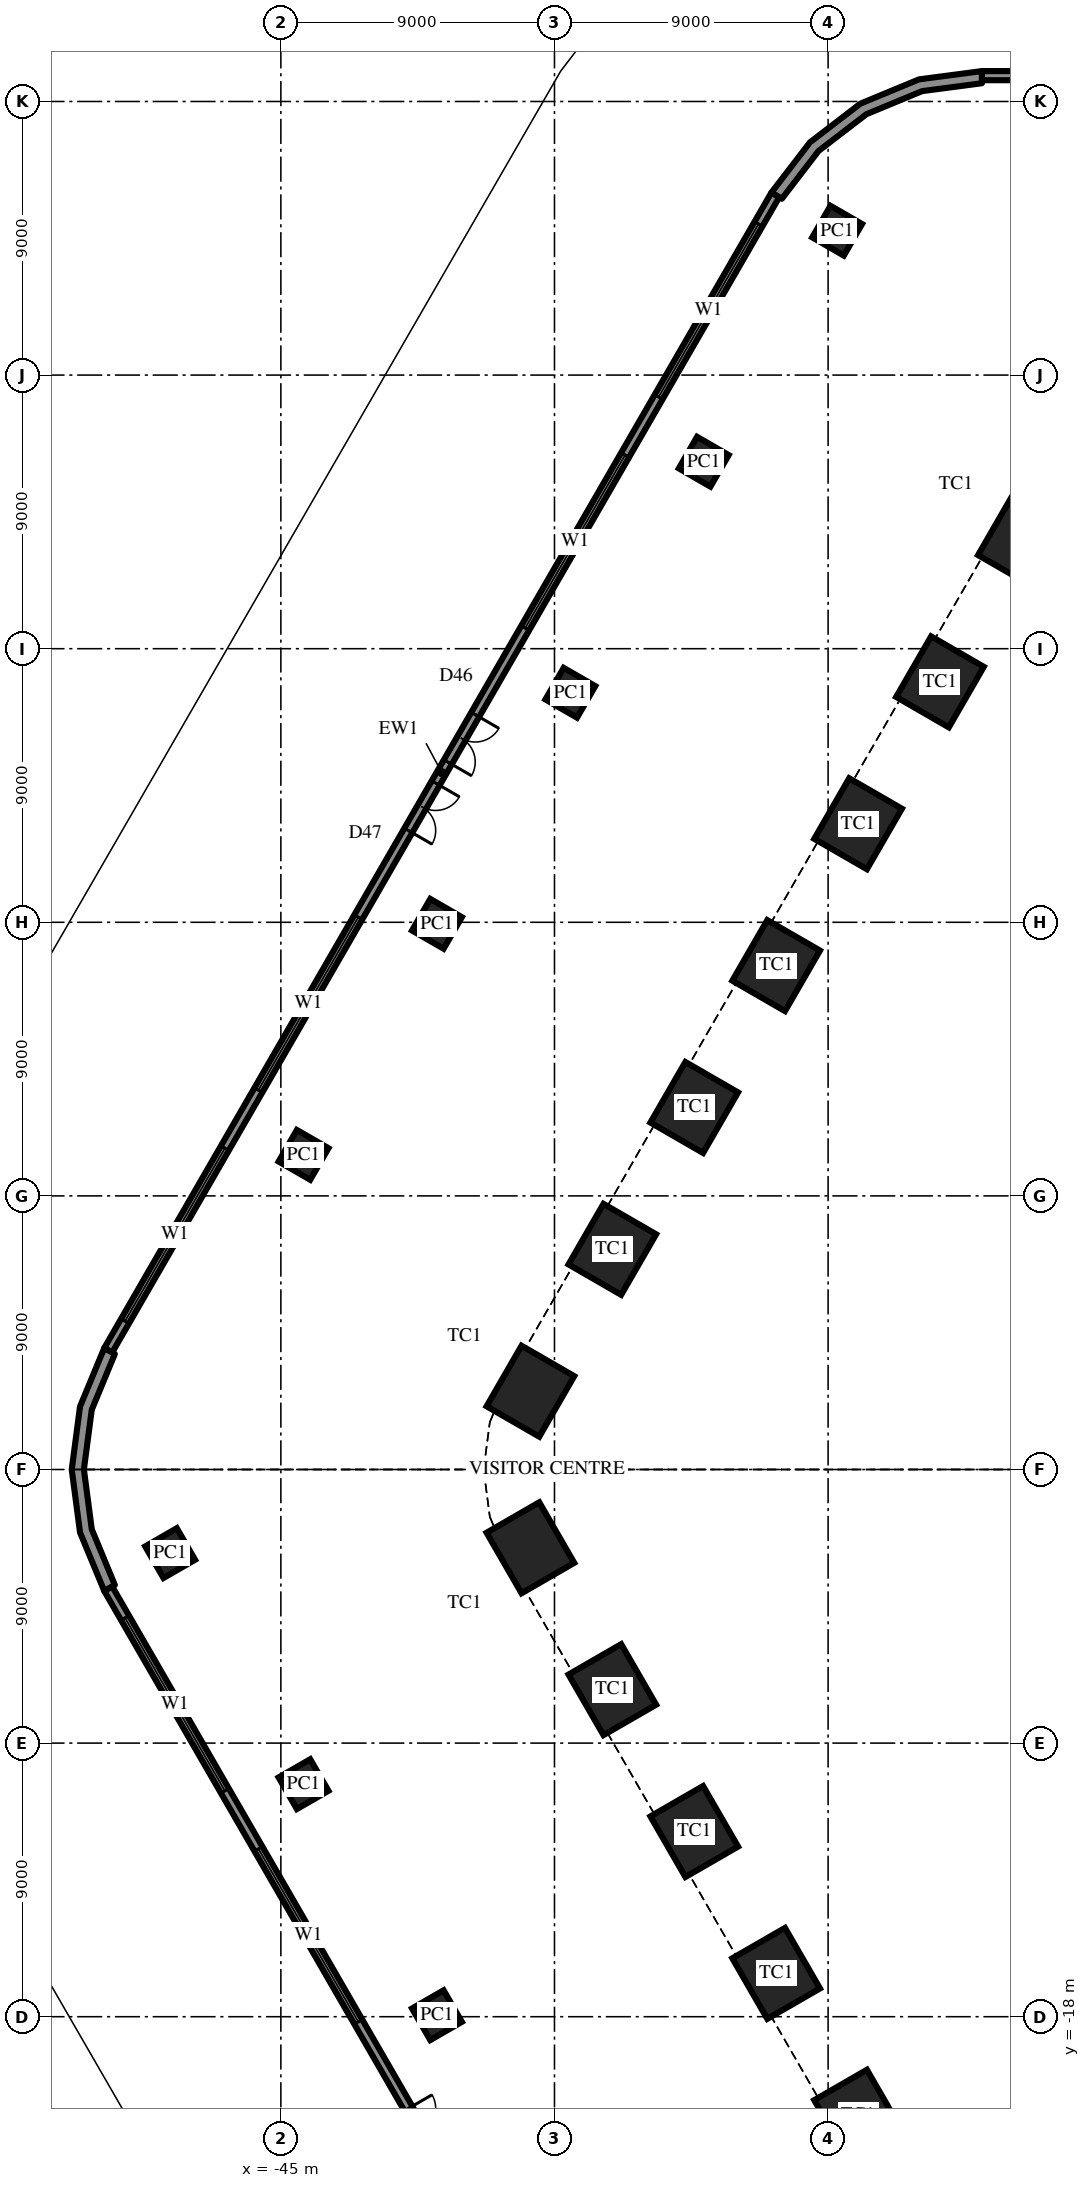
"""IFC4 building model, lengths in metres.
Left out: names, types, materials, properties, quantities, classifications, styles, units other than length and angle.
Written with IfcOpenShell. Run it as: python <this file> out.ifc"""

import sys

from ifc_helpers import new_model, si_unit, direction, frame, frame_2d, origin, origin_2d, place, context, subcontext, project, spatial, polyline, rectangle, outline, extrude, element, fill, save


model = new_model("IFC4")
c1 = context("Model", 3, precision=1e-05, world=origin(), true_north=direction((0.0, 1.0)))
c2 = subcontext(c1, "Body", "Model", "MODEL_VIEW")
j1 = project(units=[si_unit("LENGTHUNIT", "METRE"), si_unit("PLANEANGLEUNIT", "RADIAN")], contexts=[c1])
p1 = place(None, origin())
s1 = spatial("IfcSite", under=j1, at=p1, CompositionType="ELEMENT")
p2 = place(p1, origin())
s2 = spatial("IfcBuilding", under=s1, at=p2, CompositionType="ELEMENT")
p3 = place(p2, origin())
s3 = spatial("IfcBuildingStorey", under=s2, at=p3, CompositionType="ELEMENT", Elevation=0.0)
for number, where, z_axis, x_axis in (
    (1, (-20.626, 30.575, 0.0), (0.0, 0.0, 1.0), (-0.5, -0.866, 0.0)),
    (2, (-23.32, 25.908, 0.0), (0.0, 0.0, 1.0), (-0.5, -0.866, 0.0)),
    (3, (-26.014, 21.242, 0.0), (0.0, 0.0, 1.0), (-0.5, -0.866, 0.0)),
    (4, (-28.709, 16.575, 0.0), (0.0, 0.0, 1.0), (-0.5, -0.866, 0.0)),
    (5, (-31.403, 11.908, 0.0), (0.0, 0.0, 1.0), (-0.5, -0.866, 0.0)),
    (6, (-34.097, 7.242, 0.0), (0.0, 0.0, 1.0), (-0.5, -0.866, 0.0)),
    (7, (-36.792, 2.575, 0.0), (0.0, 0.0, 1.0), (-0.5, -0.866, 0.0)),
    (8, (-36.792, -2.575, 0.0), (0.0, 0.0, 1.0), (0.5, -0.866, 0.0)),
    (9, (-34.097, -7.242, 0.0), (0.0, 0.0, 1.0), (0.5, -0.866, 0.0)),
    (10, (-31.403, -11.908, 0.0), (0.0, 0.0, 1.0), (0.5, -0.866, 0.0)),
    (11, (-28.709, -16.575, 0.0), (0.0, 0.0, 1.0), (0.5, -0.866, 0.0)),
    (12, (-26.014, -21.242, 0.0), (0.0, 0.0, 1.0), (0.5, -0.866, 0.0)),
):
    element("IfcColumn", number, at=place(p3, frame(where, z_axis=z_axis, x_axis=x_axis)), inside=s3, PredefinedType="COLUMN", context=c2, shape_type="SweptSolid", body=[
        extrude(rectangle(XDim=2.3, YDim=2.0, at=origin_2d()), origin(), (0.0, 0.0, 1.0), 7.0),
    ])
for number, where, z_axis, x_axis in (
    (13, (-26.702, 40.75, 0.0), (0.0, 0.0, 1.0), (-0.5, -0.866, 0.0)),
    (14, (-31.09, 33.15, 0.0), (0.0, 0.0, 1.0), (-0.5, -0.866, 0.0)),
    (15, (-35.478, 25.55, 0.0), (0.0, 0.0, 1.0), (-0.5, -0.866, 0.0)),
    (16, (-39.866, 17.95, 0.0), (0.0, 0.0, 1.0), (-0.5, -0.866, 0.0)),
    (17, (-44.254, 10.35, 0.0), (0.0, 0.0, 1.0), (-0.5, -0.866, 0.0)),
    (18, (-48.642, -2.75, 0.0), (0.0, 0.0, 1.0), (0.5, -0.866, 0.0)),
    (19, (-44.254, -10.35, 0.0), (0.0, 0.0, 1.0), (0.5, -0.866, 0.0)),
    (20, (-39.866, -17.95, 0.0), (0.0, 0.0, 1.0), (0.5, -0.866, 0.0)),
):
    element("IfcColumn", number, at=place(p3, frame(where, z_axis=z_axis, x_axis=x_axis)), inside=s3, PredefinedType="COLUMN", context=c2, shape_type="SweptSolid", body=[
        extrude(rectangle(XDim=1.2, YDim=1.2, at=origin_2d()), origin(), (0.0, 0.0, 1.0), 7.0),
    ])
p4 = place(p3, origin())
e21 = element("IfcWall", 21, at=p4, inside=s3, PredefinedType="SOLIDWALL", context=c2, shape_type="SweptSolid", body=[
    extrude(outline(polyline([(-21.939, 46.0), (-24.01, 45.727), (-25.939, 44.928), (-27.596, 43.657), (-28.867, 42.0), (-28.521, 41.8), (-27.313, 43.374), (-25.739, 44.582), (-23.906, 45.341), (-21.939, 45.6), (-21.939, 46.0)])), origin(), (0.0, 0.0, 1.0), 6.65),
])
p5 = place(p3, origin())
e22 = element("IfcWall", 22, at=p5, inside=s3, PredefinedType="SOLIDWALL", context=c2, shape_type="SweptSolid", body=[
    extrude(outline(polyline([(-50.807, 4.0), (-51.606, 2.071), (-51.879, 0.0), (-51.606, -2.071), (-50.807, -4.0), (-50.46, -3.8), (-51.22, -1.967), (-51.479, 0.0), (-51.22, 1.967), (-50.46, 3.8), (-50.807, 4.0)])), origin(), (0.0, 0.0, 1.0), 6.65),
])
p6 = place(p3, frame((21.939, 45.85, 0.0), z_axis=(0.0, 0.0, 1.0), x_axis=(-1.0, 0.0, 0.0)))
e23 = element("IfcWall", 23, at=p6, inside=s3, PredefinedType="SOLIDWALL", context=c2, shape_type="SweptSolid", body=[
    extrude(rectangle(XDim=43.878, YDim=0.3, at=frame_2d((21.939, 0.0))), origin(), (0.0, 0.0, 1.0), 6.65),
])
p7 = place(p6, frame((1.1, 0.0, 0.3)))
e24 = element("IfcOpeningElement", 24, at=p7, cuts=e23, PredefinedType="OPENING", context=c2, shape_type="SweptSolid", body=[
    extrude(rectangle(XDim=6.576, YDim=5.0, at=frame_2d((3.288, 2.5))), frame((0.0, 0.16, 0.0), z_axis=(0.0, -1.0, 0.0), x_axis=(1.0, 0.0, 0.0)), (0.0, 0.0, 1.0), 0.32),
])
p8 = place(p6, frame((9.875, 0.0, 0.0)))
e25 = element("IfcOpeningElement", 25, at=p8, cuts=e23, PredefinedType="OPENING", context=c2, shape_type="SweptSolid", body=[
    extrude(rectangle(XDim=1.8, YDim=2.4, at=frame_2d((0.9, 1.2))), frame((0.0, 0.16, 0.0), z_axis=(0.0, -1.0, 0.0), x_axis=(1.0, 0.0, 0.0)), (0.0, 0.0, 1.0), 0.32),
])
p9 = place(p6, frame((11.976, 0.0, 0.3)))
e26 = element("IfcOpeningElement", 26, at=p9, cuts=e23, PredefinedType="OPENING", context=c2, shape_type="SweptSolid", body=[
    extrude(rectangle(XDim=4.476, YDim=5.0, at=frame_2d((2.238, 2.5))), frame((0.0, 0.16, 0.0), z_axis=(0.0, -1.0, 0.0), x_axis=(1.0, 0.0, 0.0)), (0.0, 0.0, 1.0), 0.32),
])
p10 = place(p6, frame((20.189, 0.0, 0.0)))
e27 = element("IfcOpeningElement", 27, at=p10, cuts=e23, PredefinedType="OPENING", context=c2, shape_type="SweptSolid", body=[
    extrude(rectangle(XDim=3.5, YDim=4.5, at=frame_2d((1.75, 2.25))), frame((0.0, 0.16, 0.0), z_axis=(0.0, -1.0, 0.0), x_axis=(1.0, 0.0, 0.0)), (0.0, 0.0, 1.0), 0.32),
])
p11 = place(p6, frame((32.203, 0.0, 0.0)))
e28 = element("IfcOpeningElement", 28, at=p11, cuts=e23, PredefinedType="OPENING", context=c2, shape_type="SweptSolid", body=[
    extrude(rectangle(XDim=1.8, YDim=2.4, at=frame_2d((0.9, 1.2))), frame((0.0, 0.16, 0.0), z_axis=(0.0, -1.0, 0.0), x_axis=(1.0, 0.0, 0.0)), (0.0, 0.0, 1.0), 0.32),
])
p12 = place(p6, frame((27.427, 0.0, 0.3)))
e29 = element("IfcOpeningElement", 29, at=p12, cuts=e23, PredefinedType="OPENING", context=c2, shape_type="SweptSolid", body=[
    extrude(rectangle(XDim=4.476, YDim=5.0, at=frame_2d((2.238, 2.5))), frame((0.0, 0.16, 0.0), z_axis=(0.0, -1.0, 0.0), x_axis=(1.0, 0.0, 0.0)), (0.0, 0.0, 1.0), 0.32),
])
p13 = place(p6, frame((36.203, 0.0, 0.3)))
e30 = element("IfcOpeningElement", 30, at=p13, cuts=e23, PredefinedType="OPENING", context=c2, shape_type="SweptSolid", body=[
    extrude(rectangle(XDim=6.576, YDim=5.0, at=frame_2d((3.288, 2.5))), frame((0.0, 0.16, 0.0), z_axis=(0.0, -1.0, 0.0), x_axis=(1.0, 0.0, 0.0)), (0.0, 0.0, 1.0), 0.32),
])
p14 = place(p3, frame((-28.738, 41.925, 0.0), z_axis=(0.0, 0.0, 1.0), x_axis=(-0.500002442456, -0.866023993627, 0.0)))
e31 = element("IfcWall", 31, at=p14, inside=s3, PredefinedType="SOLIDWALL", context=c2, shape_type="SweptSolid", body=[
    extrude(rectangle(XDim=43.879, YDim=0.3, at=frame_2d((21.939, 0.0))), origin(), (0.0, 0.0, 1.0), 6.65),
])
p15 = place(p14, frame((1.1, 0.0, 0.3)))
e32 = element("IfcOpeningElement", 32, at=p15, cuts=e31, PredefinedType="OPENING", context=c2, shape_type="SweptSolid", body=[
    extrude(rectangle(XDim=6.576, YDim=5.0, at=frame_2d((3.288, 2.5))), frame((0.0, 0.16, 0.0), z_axis=(0.0, -1.0, 0.0), x_axis=(1.0, 0.0, 0.0)), (0.0, 0.0, 1.0), 0.32),
])
p16 = place(p14, frame((9.875, 0.0, 0.3)))
e33 = element("IfcOpeningElement", 33, at=p16, cuts=e31, PredefinedType="OPENING", context=c2, shape_type="SweptSolid", body=[
    extrude(rectangle(XDim=6.576, YDim=5.0, at=frame_2d((3.288, 2.5))), frame((0.0, 0.16, 0.0), z_axis=(0.0, -1.0, 0.0), x_axis=(1.0, 0.0, 0.0)), (0.0, 0.0, 1.0), 0.32),
])
p17 = place(p14, frame((19.739, 0.0, 0.0)))
e34 = element("IfcOpeningElement", 34, at=p17, cuts=e31, PredefinedType="OPENING", context=c2, shape_type="SweptSolid", body=[
    extrude(rectangle(XDim=1.8, YDim=2.7, at=frame_2d((0.9, 1.35))), frame((0.0, 0.16, 0.0), z_axis=(0.0, -1.0, 0.0), x_axis=(1.0, 0.0, 0.0)), (0.0, 0.0, 1.0), 0.32),
])
p18 = place(p14, frame((22.339, 0.0, 0.0)))
e35 = element("IfcOpeningElement", 35, at=p18, cuts=e31, PredefinedType="OPENING", context=c2, shape_type="SweptSolid", body=[
    extrude(rectangle(XDim=1.8, YDim=2.7, at=frame_2d((0.9, 1.35))), frame((0.0, 0.16, 0.0), z_axis=(0.0, -1.0, 0.0), x_axis=(1.0, 0.0, 0.0)), (0.0, 0.0, 1.0), 0.32),
])
p19 = place(p14, frame((27.427, 0.0, 0.3)))
e36 = element("IfcOpeningElement", 36, at=p19, cuts=e31, PredefinedType="OPENING", context=c2, shape_type="SweptSolid", body=[
    extrude(rectangle(XDim=6.576, YDim=5.0, at=frame_2d((3.288, 2.5))), frame((0.0, 0.16, 0.0), z_axis=(0.0, -1.0, 0.0), x_axis=(1.0, 0.0, 0.0)), (0.0, 0.0, 1.0), 0.32),
])
p20 = place(p14, frame((36.203, 0.0, 0.3)))
e37 = element("IfcOpeningElement", 37, at=p20, cuts=e31, PredefinedType="OPENING", context=c2, shape_type="SweptSolid", body=[
    extrude(rectangle(XDim=6.576, YDim=5.0, at=frame_2d((3.288, 2.5))), frame((0.0, 0.16, 0.0), z_axis=(0.0, -1.0, 0.0), x_axis=(1.0, 0.0, 0.0)), (0.0, 0.0, 1.0), 0.32),
])
p21 = place(p3, frame((-50.677, -3.925, 0.0), z_axis=(0.0, 0.0, 1.0), x_axis=(0.500002442456, -0.866023993627, 0.0)))
e38 = element("IfcWall", 38, at=p21, inside=s3, PredefinedType="SOLIDWALL", context=c2, shape_type="SweptSolid", body=[
    extrude(rectangle(XDim=43.879, YDim=0.3, at=frame_2d((21.939, 0.0))), origin(), (0.0, 0.0, 1.0), 6.65),
])
p22 = place(p21, frame((1.1, 0.0, 0.3)))
e39 = element("IfcOpeningElement", 39, at=p22, cuts=e38, PredefinedType="OPENING", context=c2, shape_type="SweptSolid", body=[
    extrude(rectangle(XDim=6.576, YDim=5.0, at=frame_2d((3.288, 2.5))), frame((0.0, 0.16, 0.0), z_axis=(0.0, -1.0, 0.0), x_axis=(1.0, 0.0, 0.0)), (0.0, 0.0, 1.0), 0.32),
])
p23 = place(p21, frame((9.875, 0.0, 0.3)))
e40 = element("IfcOpeningElement", 40, at=p23, cuts=e38, PredefinedType="OPENING", context=c2, shape_type="SweptSolid", body=[
    extrude(rectangle(XDim=6.576, YDim=5.0, at=frame_2d((3.288, 2.5))), frame((0.0, 0.16, 0.0), z_axis=(0.0, -1.0, 0.0), x_axis=(1.0, 0.0, 0.0)), (0.0, 0.0, 1.0), 0.32),
])
p24 = place(p21, frame((19.739, 0.0, 0.0)))
e41 = element("IfcOpeningElement", 41, at=p24, cuts=e38, PredefinedType="OPENING", context=c2, shape_type="SweptSolid", body=[
    extrude(rectangle(XDim=1.8, YDim=2.7, at=frame_2d((0.9, 1.35))), frame((0.0, 0.16, 0.0), z_axis=(0.0, -1.0, 0.0), x_axis=(1.0, 0.0, 0.0)), (0.0, 0.0, 1.0), 0.32),
])
p25 = place(p21, frame((22.339, 0.0, 0.0)))
e42 = element("IfcOpeningElement", 42, at=p25, cuts=e38, PredefinedType="OPENING", context=c2, shape_type="SweptSolid", body=[
    extrude(rectangle(XDim=1.8, YDim=2.7, at=frame_2d((0.9, 1.35))), frame((0.0, 0.16, 0.0), z_axis=(0.0, -1.0, 0.0), x_axis=(1.0, 0.0, 0.0)), (0.0, 0.0, 1.0), 0.32),
])
p26 = place(p21, frame((27.427, 0.0, 0.3)))
e43 = element("IfcOpeningElement", 43, at=p26, cuts=e38, PredefinedType="OPENING", context=c2, shape_type="SweptSolid", body=[
    extrude(rectangle(XDim=6.576, YDim=5.0, at=frame_2d((3.288, 2.5))), frame((0.0, 0.16, 0.0), z_axis=(0.0, -1.0, 0.0), x_axis=(1.0, 0.0, 0.0)), (0.0, 0.0, 1.0), 0.32),
])
p27 = place(p21, frame((36.203, 0.0, 0.3)))
e44 = element("IfcOpeningElement", 44, at=p27, cuts=e38, PredefinedType="OPENING", context=c2, shape_type="SweptSolid", body=[
    extrude(rectangle(XDim=6.576, YDim=5.0, at=frame_2d((3.288, 2.5))), frame((0.0, 0.16, 0.0), z_axis=(0.0, -1.0, 0.0), x_axis=(1.0, 0.0, 0.0)), (0.0, 0.0, 1.0), 0.32),
])
p28 = place(p15, origin())
e45 = element("IfcWindow", 45, at=p28, inside=s3, PartitioningType="SINGLE_PANEL", PredefinedType="WINDOW", context=c2, shape_type="SweptSolid", body=[
    extrude(rectangle(XDim=6.576, YDim=5.0, at=frame_2d((3.288, 2.5))), frame((0.0, 0.03, 0.0), z_axis=(0.0, -1.0, 0.0), x_axis=(1.0, 0.0, 0.0)), (0.0, 0.0, 1.0), 0.06),
])
fill(e32, e45)
p29 = place(p16, origin())
e46 = element("IfcWindow", 46, at=p29, inside=s3, PartitioningType="SINGLE_PANEL", PredefinedType="WINDOW", context=c2, shape_type="SweptSolid", body=[
    extrude(rectangle(XDim=6.576, YDim=5.0, at=frame_2d((3.288, 2.5))), frame((0.0, 0.03, 0.0), z_axis=(0.0, -1.0, 0.0), x_axis=(1.0, 0.0, 0.0)), (0.0, 0.0, 1.0), 0.06),
])
fill(e33, e46)
p30 = place(p17, origin())
e47 = element("IfcDoor", 47, at=p30, inside=s3, OperationType="DOUBLE_DOOR_SINGLE_SWING", PredefinedType="DOOR", context=c2, shape_type="SweptSolid", body=[
    extrude(rectangle(XDim=1.8, YDim=2.7, at=frame_2d((0.9, 1.35))), frame((0.0, 0.025, 0.0), z_axis=(0.0, -1.0, 0.0), x_axis=(1.0, 0.0, 0.0)), (0.0, 0.0, 1.0), 0.05),
])
fill(e34, e47)
p31 = place(p18, origin())
e48 = element("IfcDoor", 48, at=p31, inside=s3, OperationType="DOUBLE_DOOR_SINGLE_SWING", PredefinedType="DOOR", context=c2, shape_type="SweptSolid", body=[
    extrude(rectangle(XDim=1.8, YDim=2.7, at=frame_2d((0.9, 1.35))), frame((0.0, 0.025, 0.0), z_axis=(0.0, -1.0, 0.0), x_axis=(1.0, 0.0, 0.0)), (0.0, 0.0, 1.0), 0.05),
])
fill(e35, e48)
p32 = place(p19, origin())
e49 = element("IfcWindow", 49, at=p32, inside=s3, PartitioningType="SINGLE_PANEL", PredefinedType="WINDOW", context=c2, shape_type="SweptSolid", body=[
    extrude(rectangle(XDim=6.576, YDim=5.0, at=frame_2d((3.288, 2.5))), frame((0.0, 0.03, 0.0), z_axis=(0.0, -1.0, 0.0), x_axis=(1.0, 0.0, 0.0)), (0.0, 0.0, 1.0), 0.06),
])
fill(e36, e49)
p33 = place(p20, origin())
e50 = element("IfcWindow", 50, at=p33, inside=s3, PartitioningType="SINGLE_PANEL", PredefinedType="WINDOW", context=c2, shape_type="SweptSolid", body=[
    extrude(rectangle(XDim=6.576, YDim=5.0, at=frame_2d((3.288, 2.5))), frame((0.0, 0.03, 0.0), z_axis=(0.0, -1.0, 0.0), x_axis=(1.0, 0.0, 0.0)), (0.0, 0.0, 1.0), 0.06),
])
fill(e37, e50)
p34 = place(p22, origin())
e51 = element("IfcWindow", 51, at=p34, inside=s3, PartitioningType="SINGLE_PANEL", PredefinedType="WINDOW", context=c2, shape_type="SweptSolid", body=[
    extrude(rectangle(XDim=6.576, YDim=5.0, at=frame_2d((3.288, 2.5))), frame((0.0, 0.03, 0.0), z_axis=(0.0, -1.0, 0.0), x_axis=(1.0, 0.0, 0.0)), (0.0, 0.0, 1.0), 0.06),
])
fill(e39, e51)
p35 = place(p23, origin())
e52 = element("IfcWindow", 52, at=p35, inside=s3, PartitioningType="SINGLE_PANEL", PredefinedType="WINDOW", context=c2, shape_type="SweptSolid", body=[
    extrude(rectangle(XDim=6.576, YDim=5.0, at=frame_2d((3.288, 2.5))), frame((0.0, 0.03, 0.0), z_axis=(0.0, -1.0, 0.0), x_axis=(1.0, 0.0, 0.0)), (0.0, 0.0, 1.0), 0.06),
])
fill(e40, e52)
save(model, sys.argv[1])
